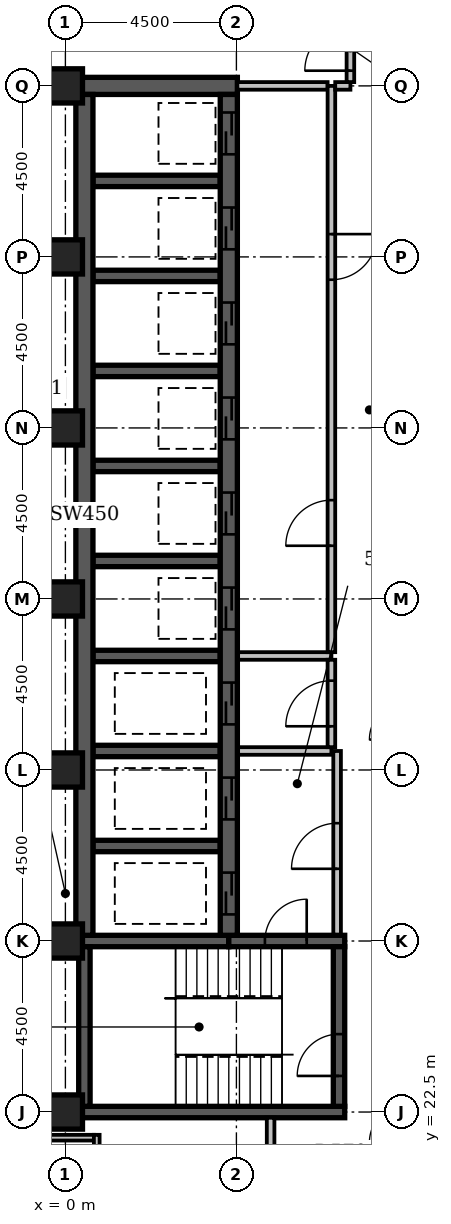
"""IFC4 building model, lengths in metres.
Left out: names, types, materials, properties, quantities, classifications, styles, units other than length and angle.
Written with IfcOpenShell. Run it as: python <this file> out.ifc"""

import sys

from ifc_helpers import new_model, si_unit, direction, frame, frame_2d, origin, origin_2d, place, context, subcontext, project, spatial, rectangle, extrude, element, fill, save


model = new_model("IFC4")
c1 = context("Model", 3, precision=1e-05, world=origin(), true_north=direction((0.0, 1.0)))
c2 = subcontext(c1, "Body", "Model", "MODEL_VIEW")
j1 = project(units=[si_unit("LENGTHUNIT", "METRE"), si_unit("PLANEANGLEUNIT", "RADIAN")], contexts=[c1])
p1 = place(None, origin())
s1 = spatial("IfcSite", under=j1, at=p1, CompositionType="ELEMENT")
p2 = place(p1, origin())
s2 = spatial("IfcBuilding", under=s1, at=p2, CompositionType="ELEMENT")
p3 = place(p2, frame((0.0, 0.0, 222.2)))
s3 = spatial("IfcBuildingStorey", under=s2, at=p3, CompositionType="ELEMENT", Elevation=222.2)
p4 = place(p3, frame((0.275, 49.5, -0.3), z_axis=(0.0, 0.0, 1.0), x_axis=(1.0, 0.0, 0.0)))
e1 = element("IfcWall", 1, at=p4, inside=s3, PredefinedType="SHEAR", context=c2, shape_type="SweptSolid", body=[
    extrude(rectangle(XDim=4.25, YDim=0.45, at=frame_2d((2.125, 0.0))), origin(), (0.0, 0.0, 1.0), 3.6),
])
p5 = place(p3, frame((0.35, 22.5, -0.3), z_axis=(0.0, 0.0, 1.0), x_axis=(1.0, 0.0, 0.0)))
e2 = element("IfcWall", 2, at=p5, inside=s3, PredefinedType="SHEAR", context=c2, shape_type="SweptSolid", body=[
    extrude(rectangle(XDim=7.0, YDim=0.3, at=frame_2d((3.5, 0.0))), origin(), (0.0, 0.0, 1.0), 3.6),
])
p6 = place(p3, frame((0.35, 27.0, -0.3), z_axis=(0.0, 0.0, 1.0), x_axis=(1.0, 0.0, 0.0)))
e3 = element("IfcWall", 3, at=p6, inside=s3, PredefinedType="SHEAR", context=c2, shape_type="SweptSolid", body=[
    extrude(rectangle(XDim=3.95, YDim=0.3, at=frame_2d((1.975, 0.0))), origin(), (0.0, 0.0, 1.0), 3.6),
])
p7 = place(p3, frame((0.5, 22.65, -0.3), z_axis=(0.0, 0.0, 1.0), x_axis=(0.0, 1.0, 0.0)))
e4 = element("IfcWall", 4, at=p7, inside=s3, PredefinedType="SHEAR", context=c2, shape_type="SweptSolid", body=[
    extrude(rectangle(XDim=4.2, YDim=0.3, at=frame_2d((2.1, 0.0))), origin(), (0.0, 0.0, 1.0), 3.6),
])
p8 = place(p3, frame((0.5, 27.15, -0.3), z_axis=(0.0, 0.0, 1.0), x_axis=(0.0, 1.0, 0.0)))
e5 = element("IfcWall", 5, at=p8, inside=s3, PredefinedType="SHEAR", context=c2, shape_type="SweptSolid", body=[
    extrude(rectangle(XDim=22.125, YDim=0.45, at=frame_2d((11.062, 0.0))), origin(), (0.0, 0.0, 1.0), 3.6),
])
for number, where, z_axis, x_axis in (
    (6, (0.725, 29.5, -0.3), (0.0, 0.0, 1.0), (1.0, 0.0, 0.0)),
    (7, (0.725, 32.0, -0.3), (0.0, 0.0, 1.0), (1.0, 0.0, 0.0)),
    (8, (0.725, 34.5, -0.3), (0.0, 0.0, 1.0), (1.0, 0.0, 0.0)),
    (9, (0.725, 37.0, -0.3), (0.0, 0.0, 1.0), (1.0, 0.0, 0.0)),
    (10, (0.725, 39.5, -0.3), (0.0, 0.0, 1.0), (1.0, 0.0, 0.0)),
    (11, (0.725, 42.0, -0.3), (0.0, 0.0, 1.0), (1.0, 0.0, 0.0)),
    (12, (0.725, 44.5, -0.3), (0.0, 0.0, 1.0), (1.0, 0.0, 0.0)),
    (13, (0.725, 47.0, -0.3), (0.0, 0.0, 1.0), (1.0, 0.0, 0.0)),
):
    element("IfcWall", number, at=place(p3, frame(where, z_axis=z_axis, x_axis=x_axis)), inside=s3, PredefinedType="SHEAR", context=c2, shape_type="SweptSolid", body=[
        extrude(rectangle(XDim=3.35, YDim=0.3, at=frame_2d((1.675, 0.0))), origin(), (0.0, 0.0, 1.0), 3.6),
    ])
p9 = place(p3, frame((4.3, 27.0, -0.3), z_axis=(0.0, 0.0, 1.0), x_axis=(1.0, 0.0, 0.0)))
e14 = element("IfcWall", 14, at=p9, inside=s3, PredefinedType="SHEAR", context=c2, shape_type="SweptSolid", body=[
    extrude(rectangle(XDim=3.05, YDim=0.3, at=frame_2d((1.525, 0.0))), origin(), (0.0, 0.0, 1.0), 3.6),
])
p10 = place(p9, frame((0.95, 0.0, 0.3)))
e15 = element("IfcOpeningElement", 15, at=p10, cuts=e14, PredefinedType="OPENING", context=c2, shape_type="SweptSolid", body=[
    extrude(rectangle(XDim=1.1, YDim=2.1, at=frame_2d((0.55, 1.05))), frame((0.0, 0.162, 0.0), z_axis=(0.0, -1.0, 0.0), x_axis=(1.0, 0.0, 0.0)), (0.0, 0.0, 1.0), 0.324),
])
p11 = place(p3, frame((4.3, 27.15, -0.3), z_axis=(0.0, 0.0, 1.0), x_axis=(0.0, 1.0, 0.0)))
e16 = element("IfcWall", 16, at=p11, inside=s3, PredefinedType="SHEAR", context=c2, shape_type="SweptSolid", body=[
    extrude(rectangle(XDim=22.125, YDim=0.45, at=frame_2d((11.062, 0.0))), origin(), (0.0, 0.0, 1.0), 3.6),
])
p12 = place(p11, frame((3.05, 0.0, 0.3)))
e17 = element("IfcOpeningElement", 17, at=p12, cuts=e16, PredefinedType="OPENING", context=c2, shape_type="SweptSolid", body=[
    extrude(rectangle(XDim=1.1, YDim=2.1, at=frame_2d((0.55, 1.05))), frame((0.0, 0.237, 0.0), z_axis=(0.0, -1.0, 0.0), x_axis=(1.0, 0.0, 0.0)), (0.0, 0.0, 1.0), 0.474),
])
p13 = place(p11, frame((0.55, 0.0, 0.3)))
e18 = element("IfcOpeningElement", 18, at=p13, cuts=e16, PredefinedType="OPENING", context=c2, shape_type="SweptSolid", body=[
    extrude(rectangle(XDim=1.1, YDim=2.1, at=frame_2d((0.55, 1.05))), frame((0.0, 0.237, 0.0), z_axis=(0.0, -1.0, 0.0), x_axis=(1.0, 0.0, 0.0)), (0.0, 0.0, 1.0), 0.474),
])
p14 = place(p11, frame((20.55, 0.0, 0.3)))
e19 = element("IfcOpeningElement", 19, at=p14, cuts=e16, PredefinedType="OPENING", context=c2, shape_type="SweptSolid", body=[
    extrude(rectangle(XDim=1.1, YDim=2.1, at=frame_2d((0.55, 1.05))), frame((0.0, 0.237, 0.0), z_axis=(0.0, -1.0, 0.0), x_axis=(1.0, 0.0, 0.0)), (0.0, 0.0, 1.0), 0.474),
])
p15 = place(p11, frame((18.05, 0.0, 0.3)))
e20 = element("IfcOpeningElement", 20, at=p15, cuts=e16, PredefinedType="OPENING", context=c2, shape_type="SweptSolid", body=[
    extrude(rectangle(XDim=1.1, YDim=2.1, at=frame_2d((0.55, 1.05))), frame((0.0, 0.237, 0.0), z_axis=(0.0, -1.0, 0.0), x_axis=(1.0, 0.0, 0.0)), (0.0, 0.0, 1.0), 0.474),
])
p16 = place(p11, frame((15.55, 0.0, 0.3)))
e21 = element("IfcOpeningElement", 21, at=p16, cuts=e16, PredefinedType="OPENING", context=c2, shape_type="SweptSolid", body=[
    extrude(rectangle(XDim=1.1, YDim=2.1, at=frame_2d((0.55, 1.05))), frame((0.0, 0.237, 0.0), z_axis=(0.0, -1.0, 0.0), x_axis=(1.0, 0.0, 0.0)), (0.0, 0.0, 1.0), 0.474),
])
p17 = place(p11, frame((13.05, 0.0, 0.3)))
e22 = element("IfcOpeningElement", 22, at=p17, cuts=e16, PredefinedType="OPENING", context=c2, shape_type="SweptSolid", body=[
    extrude(rectangle(XDim=1.1, YDim=2.1, at=frame_2d((0.55, 1.05))), frame((0.0, 0.237, 0.0), z_axis=(0.0, -1.0, 0.0), x_axis=(1.0, 0.0, 0.0)), (0.0, 0.0, 1.0), 0.474),
])
p18 = place(p11, frame((10.55, 0.0, 0.3)))
e23 = element("IfcOpeningElement", 23, at=p18, cuts=e16, PredefinedType="OPENING", context=c2, shape_type="SweptSolid", body=[
    extrude(rectangle(XDim=1.1, YDim=2.1, at=frame_2d((0.55, 1.05))), frame((0.0, 0.237, 0.0), z_axis=(0.0, -1.0, 0.0), x_axis=(1.0, 0.0, 0.0)), (0.0, 0.0, 1.0), 0.474),
])
p19 = place(p11, frame((8.05, 0.0, 0.3)))
e24 = element("IfcOpeningElement", 24, at=p19, cuts=e16, PredefinedType="OPENING", context=c2, shape_type="SweptSolid", body=[
    extrude(rectangle(XDim=1.1, YDim=2.1, at=frame_2d((0.55, 1.05))), frame((0.0, 0.237, 0.0), z_axis=(0.0, -1.0, 0.0), x_axis=(1.0, 0.0, 0.0)), (0.0, 0.0, 1.0), 0.474),
])
p20 = place(p11, frame((5.55, 0.0, 0.3)))
e25 = element("IfcOpeningElement", 25, at=p20, cuts=e16, PredefinedType="OPENING", context=c2, shape_type="SweptSolid", body=[
    extrude(rectangle(XDim=1.1, YDim=2.1, at=frame_2d((0.55, 1.05))), frame((0.0, 0.237, 0.0), z_axis=(0.0, -1.0, 0.0), x_axis=(1.0, 0.0, 0.0)), (0.0, 0.0, 1.0), 0.474),
])
p21 = place(p3, frame((7.2, 22.65, -0.3), z_axis=(0.0, 0.0, 1.0), x_axis=(0.0, 1.0, 0.0)))
e26 = element("IfcWall", 26, at=p21, inside=s3, PredefinedType="SHEAR", context=c2, shape_type="SweptSolid", body=[
    extrude(rectangle(XDim=4.2, YDim=0.3, at=frame_2d((2.1, 0.0))), origin(), (0.0, 0.0, 1.0), 3.6),
])
p22 = place(p21, frame((0.8, 0.0, 0.3)))
e27 = element("IfcOpeningElement", 27, at=p22, cuts=e26, PredefinedType="OPENING", context=c2, shape_type="SweptSolid", body=[
    extrude(rectangle(XDim=1.1, YDim=2.1, at=frame_2d((0.55, 1.05))), frame((0.0, 0.162, 0.0), z_axis=(0.0, -1.0, 0.0), x_axis=(1.0, 0.0, 0.0)), (0.0, 0.0, 1.0), 0.324),
])
for number, where, z_axis, x_axis in (
    (28, (0.0, 22.5, -0.3), (0.0, 0.0, 1.0), (1.0, 0.0, 0.0)),
    (29, (0.0, 27.0, -0.3), (0.0, 0.0, 1.0), (1.0, 0.0, 0.0)),
    (30, (0.0, 31.5, -0.3), (0.0, 0.0, 1.0), (1.0, 0.0, 0.0)),
    (31, (0.0, 36.0, -0.3), (0.0, 0.0, 1.0), (1.0, 0.0, 0.0)),
    (32, (0.0, 40.5, -0.3), (0.0, 0.0, 1.0), (1.0, 0.0, 0.0)),
    (33, (0.0, 45.0, -0.3), (0.0, 0.0, 1.0), (1.0, 0.0, 0.0)),
    (34, (0.0, 49.5, -0.3), (0.0, 0.0, 1.0), (1.0, 0.0, 0.0)),
):
    element("IfcColumn", number, at=place(p3, frame(where, z_axis=z_axis, x_axis=x_axis)), inside=s3, PredefinedType="COLUMN", context=c2, shape_type="SweptSolid", body=[
        extrude(rectangle(XDim=0.9, YDim=0.9, at=origin_2d()), origin(), (0.0, 0.0, 1.0), 3.6),
    ])
p23 = place(p3, frame((-0.6, 21.825, 0.0), z_axis=(0.0, 0.0, 1.0), x_axis=(1.0, 0.0, 0.0)))
e35 = element("IfcWall", 35, at=p23, inside=s3, PredefinedType="STANDARD", context=c2, shape_type="SweptSolid", body=[
    extrude(rectangle(XDim=1.35, YDim=0.15, at=frame_2d((0.675, 0.0))), origin(), (0.0, 0.0, 1.0), 2.7),
])
p24 = place(p3, frame((0.825, 21.9, 0.0), z_axis=(0.0, 0.0, 1.0), x_axis=(0.0, -1.0, 0.0)))
e36 = element("IfcWall", 36, at=p24, inside=s3, PredefinedType="STANDARD", context=c2, shape_type="SweptSolid", body=[
    extrude(rectangle(XDim=1.65, YDim=0.15, at=frame_2d((0.825, 0.0))), origin(), (0.0, 0.0, 1.0), 2.7),
])
p25 = place(p3, frame((4.545, 34.5, 0.0), z_axis=(0.0, 0.0, 1.0), x_axis=(1.0, 0.0, 0.0)))
e37 = element("IfcWall", 37, at=p25, inside=s3, PredefinedType="PARTITIONING", context=c2, shape_type="SweptSolid", body=[
    extrude(rectangle(XDim=2.455, YDim=0.2, at=frame_2d((1.228, 0.0))), origin(), (0.0, 0.0, 1.0), 3.3),
])
p26 = place(p3, frame((7.0, 34.6, 0.0), z_axis=(0.0, 0.0, 1.0), x_axis=(0.0, 1.0, 0.0)))
e38 = element("IfcWall", 38, at=p26, inside=s3, PredefinedType="PARTITIONING", context=c2, shape_type="SweptSolid", body=[
    extrude(rectangle(XDim=14.9, YDim=0.2, at=frame_2d((7.45, 0.0))), origin(), (0.0, 0.0, 1.0), 3.3),
])
p27 = place(p26, frame((2.8, 0.0, 0.0)))
e39 = element("IfcOpeningElement", 39, at=p27, cuts=e38, PredefinedType="OPENING", context=c2, shape_type="SweptSolid", body=[
    extrude(rectangle(XDim=1.2, YDim=2.1, at=frame_2d((0.6, 1.05))), frame((0.0, 0.112, 0.0), z_axis=(0.0, -1.0, 0.0), x_axis=(1.0, 0.0, 0.0)), (0.0, 0.0, 1.0), 0.224),
])
p28 = place(p26, frame((9.8, 0.0, 0.0)))
e40 = element("IfcOpeningElement", 40, at=p28, cuts=e38, PredefinedType="OPENING", context=c2, shape_type="SweptSolid", body=[
    extrude(rectangle(XDim=1.2, YDim=2.1, at=frame_2d((0.6, 1.05))), frame((0.0, 0.112, 0.0), z_axis=(0.0, -1.0, 0.0), x_axis=(1.0, 0.0, 0.0)), (0.0, 0.0, 1.0), 0.224),
])
p29 = place(p3, frame((4.525, 49.5, 0.0), z_axis=(0.0, 0.0, 1.0), x_axis=(1.0, 0.0, 0.0)))
e41 = element("IfcWall", 41, at=p29, inside=s3, PredefinedType="PARTITIONING", context=c2, shape_type="SweptSolid", body=[
    extrude(rectangle(XDim=2.375, YDim=0.2, at=frame_2d((1.188, 0.0))), origin(), (0.0, 0.0, 1.0), 3.3),
])
p30 = place(p3, frame((4.545, 32.0, 0.0), z_axis=(0.0, 0.0, 1.0), x_axis=(1.0, 0.0, 0.0)))
e42 = element("IfcWall", 42, at=p30, inside=s3, PredefinedType="PARTITIONING", context=c2, shape_type="SweptSolid", body=[
    extrude(rectangle(XDim=2.455, YDim=0.2, at=frame_2d((1.228, 0.0))), origin(), (0.0, 0.0, 1.0), 3.3),
])
p31 = place(p3, frame((7.0, 32.1, 0.0), z_axis=(0.0, 0.0, 1.0), x_axis=(0.0, 1.0, 0.0)))
e43 = element("IfcWall", 43, at=p31, inside=s3, PredefinedType="PARTITIONING", context=c2, shape_type="SweptSolid", body=[
    extrude(rectangle(XDim=2.3, YDim=0.2, at=frame_2d((1.15, 0.0))), origin(), (0.0, 0.0, 1.0), 3.3),
])
p32 = place(p31, frame((0.55, 0.0, 0.0)))
e44 = element("IfcOpeningElement", 44, at=p32, cuts=e43, PredefinedType="OPENING", context=c2, shape_type="SweptSolid", body=[
    extrude(rectangle(XDim=1.2, YDim=2.1, at=frame_2d((0.6, 1.05))), frame((0.0, 0.112, 0.0), z_axis=(0.0, -1.0, 0.0), x_axis=(1.0, 0.0, 0.0)), (0.0, 0.0, 1.0), 0.224),
])
p33 = place(p3, frame((7.15, 27.17, 0.0), z_axis=(0.0, 0.0, 1.0), x_axis=(0.0, 1.0, 0.0)))
e45 = element("IfcWall", 45, at=p33, inside=s3, PredefinedType="PARTITIONING", context=c2, shape_type="SweptSolid", body=[
    extrude(rectangle(XDim=4.83, YDim=0.2, at=frame_2d((2.415, 0.0))), origin(), (0.0, 0.0, 1.0), 3.3),
])
p34 = place(p33, frame((1.73, 0.0, 0.0)))
e46 = element("IfcOpeningElement", 46, at=p34, cuts=e45, PredefinedType="OPENING", context=c2, shape_type="SweptSolid", body=[
    extrude(rectangle(XDim=1.2, YDim=2.1, at=frame_2d((0.6, 1.05))), frame((0.0, 0.112, 0.0), z_axis=(0.0, -1.0, 0.0), x_axis=(1.0, 0.0, 0.0)), (0.0, 0.0, 1.0), 0.224),
])
p35 = place(p3, frame((7.1, 49.5, 0.0), z_axis=(0.0, 0.0, 1.0), x_axis=(1.0, 0.0, 0.0)))
e47 = element("IfcWall", 47, at=p35, inside=s3, PredefinedType="PARTITIONING", context=c2, shape_type="SweptSolid", body=[
    extrude(rectangle(XDim=0.4, YDim=0.2, at=frame_2d((0.2, 0.0))), origin(), (0.0, 0.0, 1.0), 3.3),
])
p36 = place(p3, frame((7.5, 49.6, 0.0), z_axis=(0.0, 0.0, 1.0), x_axis=(0.0, 1.0, 0.0)))
e48 = element("IfcWall", 48, at=p36, inside=s3, PredefinedType="PARTITIONING", context=c2, shape_type="SweptSolid", body=[
    extrude(rectangle(XDim=3.9, YDim=0.2, at=frame_2d((1.95, 0.0))), origin(), (0.0, 0.0, 1.0), 3.3),
])
p37 = place(p36, frame((0.3, 0.0, 0.0)))
e49 = element("IfcOpeningElement", 49, at=p37, cuts=e48, PredefinedType="OPENING", context=c2, shape_type="SweptSolid", body=[
    extrude(rectangle(XDim=1.2, YDim=2.1, at=frame_2d((0.6, 1.05))), frame((0.0, 0.112, 0.0), z_axis=(0.0, -1.0, 0.0), x_axis=(1.0, 0.0, 0.0)), (0.0, 0.0, 1.0), 0.224),
])
p38 = place(p3, frame((5.4, 17.4, 0.0), z_axis=(0.0, 0.0, 1.0), x_axis=(0.0, 1.0, 0.0)))
e50 = element("IfcWall", 50, at=p38, inside=s3, PredefinedType="PARTITIONING", context=c2, shape_type="SweptSolid", body=[
    extrude(rectangle(XDim=4.95, YDim=0.2, at=frame_2d((2.475, 0.0))), origin(), (0.0, 0.0, 1.0), 3.3),
])
p39 = place(p38, frame((2.55, 0.0, 0.0)))
e51 = element("IfcOpeningElement", 51, at=p39, cuts=e50, PredefinedType="OPENING", context=c2, shape_type="SweptSolid", body=[
    extrude(rectangle(XDim=1.0, YDim=2.1, at=frame_2d((0.5, 1.05))), frame((0.0, 0.112, 0.0), z_axis=(0.0, -1.0, 0.0), x_axis=(1.0, 0.0, 0.0)), (0.0, 0.0, 1.0), 0.224),
])
p40 = place(p37, origin())
e52 = element("IfcDoor", 52, at=p40, inside=s3, OperationType="SINGLE_SWING_LEFT", PredefinedType="DOOR", context=c2, shape_type="SweptSolid", body=[
    extrude(rectangle(XDim=1.2, YDim=2.1, at=frame_2d((0.6, 1.05))), frame((0.0, 0.025, 0.0), z_axis=(0.0, -1.0, 0.0), x_axis=(1.0, 0.0, 0.0)), (0.0, 0.0, 1.0), 0.05),
])
fill(e49, e52)
p41 = place(p34, origin())
e53 = element("IfcDoor", 53, at=p41, inside=s3, OperationType="SINGLE_SWING_LEFT", PredefinedType="DOOR", context=c2, shape_type="SweptSolid", body=[
    extrude(rectangle(XDim=1.2, YDim=2.1, at=frame_2d((0.6, 1.05))), frame((0.0, 0.025, 0.0), z_axis=(0.0, -1.0, 0.0), x_axis=(1.0, 0.0, 0.0)), (0.0, 0.0, 1.0), 0.05),
])
fill(e46, e53)
p42 = place(p12, origin())
e54 = element("IfcDoor", 54, at=p42, inside=s3, OperationType="SLIDING_TO_LEFT", PredefinedType="DOOR", context=c2, shape_type="SweptSolid", body=[
    extrude(rectangle(XDim=1.1, YDim=2.1, at=frame_2d((0.55, 1.05))), frame((0.0, 0.025, 0.0), z_axis=(0.0, -1.0, 0.0), x_axis=(1.0, 0.0, 0.0)), (0.0, 0.0, 1.0), 0.05),
])
fill(e17, e54)
p43 = place(p13, origin())
e55 = element("IfcDoor", 55, at=p43, inside=s3, OperationType="SLIDING_TO_LEFT", PredefinedType="DOOR", context=c2, shape_type="SweptSolid", body=[
    extrude(rectangle(XDim=1.1, YDim=2.1, at=frame_2d((0.55, 1.05))), frame((0.0, 0.025, 0.0), z_axis=(0.0, -1.0, 0.0), x_axis=(1.0, 0.0, 0.0)), (0.0, 0.0, 1.0), 0.05),
])
fill(e18, e55)
p44 = place(p14, origin())
e56 = element("IfcDoor", 56, at=p44, inside=s3, OperationType="SLIDING_TO_LEFT", PredefinedType="DOOR", context=c2, shape_type="SweptSolid", body=[
    extrude(rectangle(XDim=1.1, YDim=2.1, at=frame_2d((0.55, 1.05))), frame((0.0, 0.025, 0.0), z_axis=(0.0, -1.0, 0.0), x_axis=(1.0, 0.0, 0.0)), (0.0, 0.0, 1.0), 0.05),
])
fill(e19, e56)
p45 = place(p15, origin())
e57 = element("IfcDoor", 57, at=p45, inside=s3, OperationType="SLIDING_TO_LEFT", PredefinedType="DOOR", context=c2, shape_type="SweptSolid", body=[
    extrude(rectangle(XDim=1.1, YDim=2.1, at=frame_2d((0.55, 1.05))), frame((0.0, 0.025, 0.0), z_axis=(0.0, -1.0, 0.0), x_axis=(1.0, 0.0, 0.0)), (0.0, 0.0, 1.0), 0.05),
])
fill(e20, e57)
p46 = place(p16, origin())
e58 = element("IfcDoor", 58, at=p46, inside=s3, OperationType="SLIDING_TO_LEFT", PredefinedType="DOOR", context=c2, shape_type="SweptSolid", body=[
    extrude(rectangle(XDim=1.1, YDim=2.1, at=frame_2d((0.55, 1.05))), frame((0.0, 0.025, 0.0), z_axis=(0.0, -1.0, 0.0), x_axis=(1.0, 0.0, 0.0)), (0.0, 0.0, 1.0), 0.05),
])
fill(e21, e58)
p47 = place(p17, origin())
e59 = element("IfcDoor", 59, at=p47, inside=s3, OperationType="SLIDING_TO_LEFT", PredefinedType="DOOR", context=c2, shape_type="SweptSolid", body=[
    extrude(rectangle(XDim=1.1, YDim=2.1, at=frame_2d((0.55, 1.05))), frame((0.0, 0.025, 0.0), z_axis=(0.0, -1.0, 0.0), x_axis=(1.0, 0.0, 0.0)), (0.0, 0.0, 1.0), 0.05),
])
fill(e22, e59)
p48 = place(p18, origin())
e60 = element("IfcDoor", 60, at=p48, inside=s3, OperationType="SLIDING_TO_LEFT", PredefinedType="DOOR", context=c2, shape_type="SweptSolid", body=[
    extrude(rectangle(XDim=1.1, YDim=2.1, at=frame_2d((0.55, 1.05))), frame((0.0, 0.025, 0.0), z_axis=(0.0, -1.0, 0.0), x_axis=(1.0, 0.0, 0.0)), (0.0, 0.0, 1.0), 0.05),
])
fill(e23, e60)
p49 = place(p19, origin())
e61 = element("IfcDoor", 61, at=p49, inside=s3, OperationType="SLIDING_TO_LEFT", PredefinedType="DOOR", context=c2, shape_type="SweptSolid", body=[
    extrude(rectangle(XDim=1.1, YDim=2.1, at=frame_2d((0.55, 1.05))), frame((0.0, 0.025, 0.0), z_axis=(0.0, -1.0, 0.0), x_axis=(1.0, 0.0, 0.0)), (0.0, 0.0, 1.0), 0.05),
])
fill(e24, e61)
p50 = place(p27, origin())
e62 = element("IfcDoor", 62, at=p50, inside=s3, OperationType="SINGLE_SWING_LEFT", PredefinedType="DOOR", context=c2, shape_type="SweptSolid", body=[
    extrude(rectangle(XDim=1.2, YDim=2.1, at=frame_2d((0.6, 1.05))), frame((0.0, 0.025, 0.0), z_axis=(0.0, -1.0, 0.0), x_axis=(1.0, 0.0, 0.0)), (0.0, 0.0, 1.0), 0.05),
])
fill(e39, e62)
p51 = place(p28, origin())
e63 = element("IfcDoor", 63, at=p51, inside=s3, OperationType="SINGLE_SWING_RIGHT", PredefinedType="DOOR", context=c2, shape_type="SweptSolid", body=[
    extrude(rectangle(XDim=1.2, YDim=2.1, at=frame_2d((0.6, 1.05))), frame((0.0, 0.025, 0.0), z_axis=(0.0, -1.0, 0.0), x_axis=(1.0, 0.0, 0.0)), (0.0, 0.0, 1.0), 0.05),
])
fill(e40, e63)
p52 = place(p32, origin())
e64 = element("IfcDoor", 64, at=p52, inside=s3, OperationType="SINGLE_SWING_LEFT", PredefinedType="DOOR", context=c2, shape_type="SweptSolid", body=[
    extrude(rectangle(XDim=1.2, YDim=2.1, at=frame_2d((0.6, 1.05))), frame((0.0, 0.025, 0.0), z_axis=(0.0, -1.0, 0.0), x_axis=(1.0, 0.0, 0.0)), (0.0, 0.0, 1.0), 0.05),
])
fill(e44, e64)
p53 = place(p20, origin())
e65 = element("IfcDoor", 65, at=p53, inside=s3, OperationType="SLIDING_TO_LEFT", PredefinedType="DOOR", context=c2, shape_type="SweptSolid", body=[
    extrude(rectangle(XDim=1.1, YDim=2.1, at=frame_2d((0.55, 1.05))), frame((0.0, 0.025, 0.0), z_axis=(0.0, -1.0, 0.0), x_axis=(1.0, 0.0, 0.0)), (0.0, 0.0, 1.0), 0.05),
])
fill(e25, e65)
p54 = place(p10, frame((1.1, 0.0, 0.0), z_axis=(0.0, 0.0, 1.0), x_axis=(-1.0, 0.0, 0.0)))
e66 = element("IfcDoor", 66, at=p54, inside=s3, OperationType="SINGLE_SWING_LEFT", PredefinedType="DOOR", context=c2, shape_type="SweptSolid", body=[
    extrude(rectangle(XDim=1.1, YDim=2.1, at=frame_2d((0.55, 1.05))), frame((0.0, 0.025, 0.0), z_axis=(0.0, -1.0, 0.0), x_axis=(1.0, 0.0, 0.0)), (0.0, 0.0, 1.0), 0.05),
])
fill(e15, e66)
p55 = place(p22, origin())
e67 = element("IfcDoor", 67, at=p55, inside=s3, OperationType="SINGLE_SWING_LEFT", PredefinedType="DOOR", context=c2, shape_type="SweptSolid", body=[
    extrude(rectangle(XDim=1.1, YDim=2.1, at=frame_2d((0.55, 1.05))), frame((0.0, 0.025, 0.0), z_axis=(0.0, -1.0, 0.0), x_axis=(1.0, 0.0, 0.0)), (0.0, 0.0, 1.0), 0.05),
])
fill(e27, e67)
save(model, sys.argv[1])
